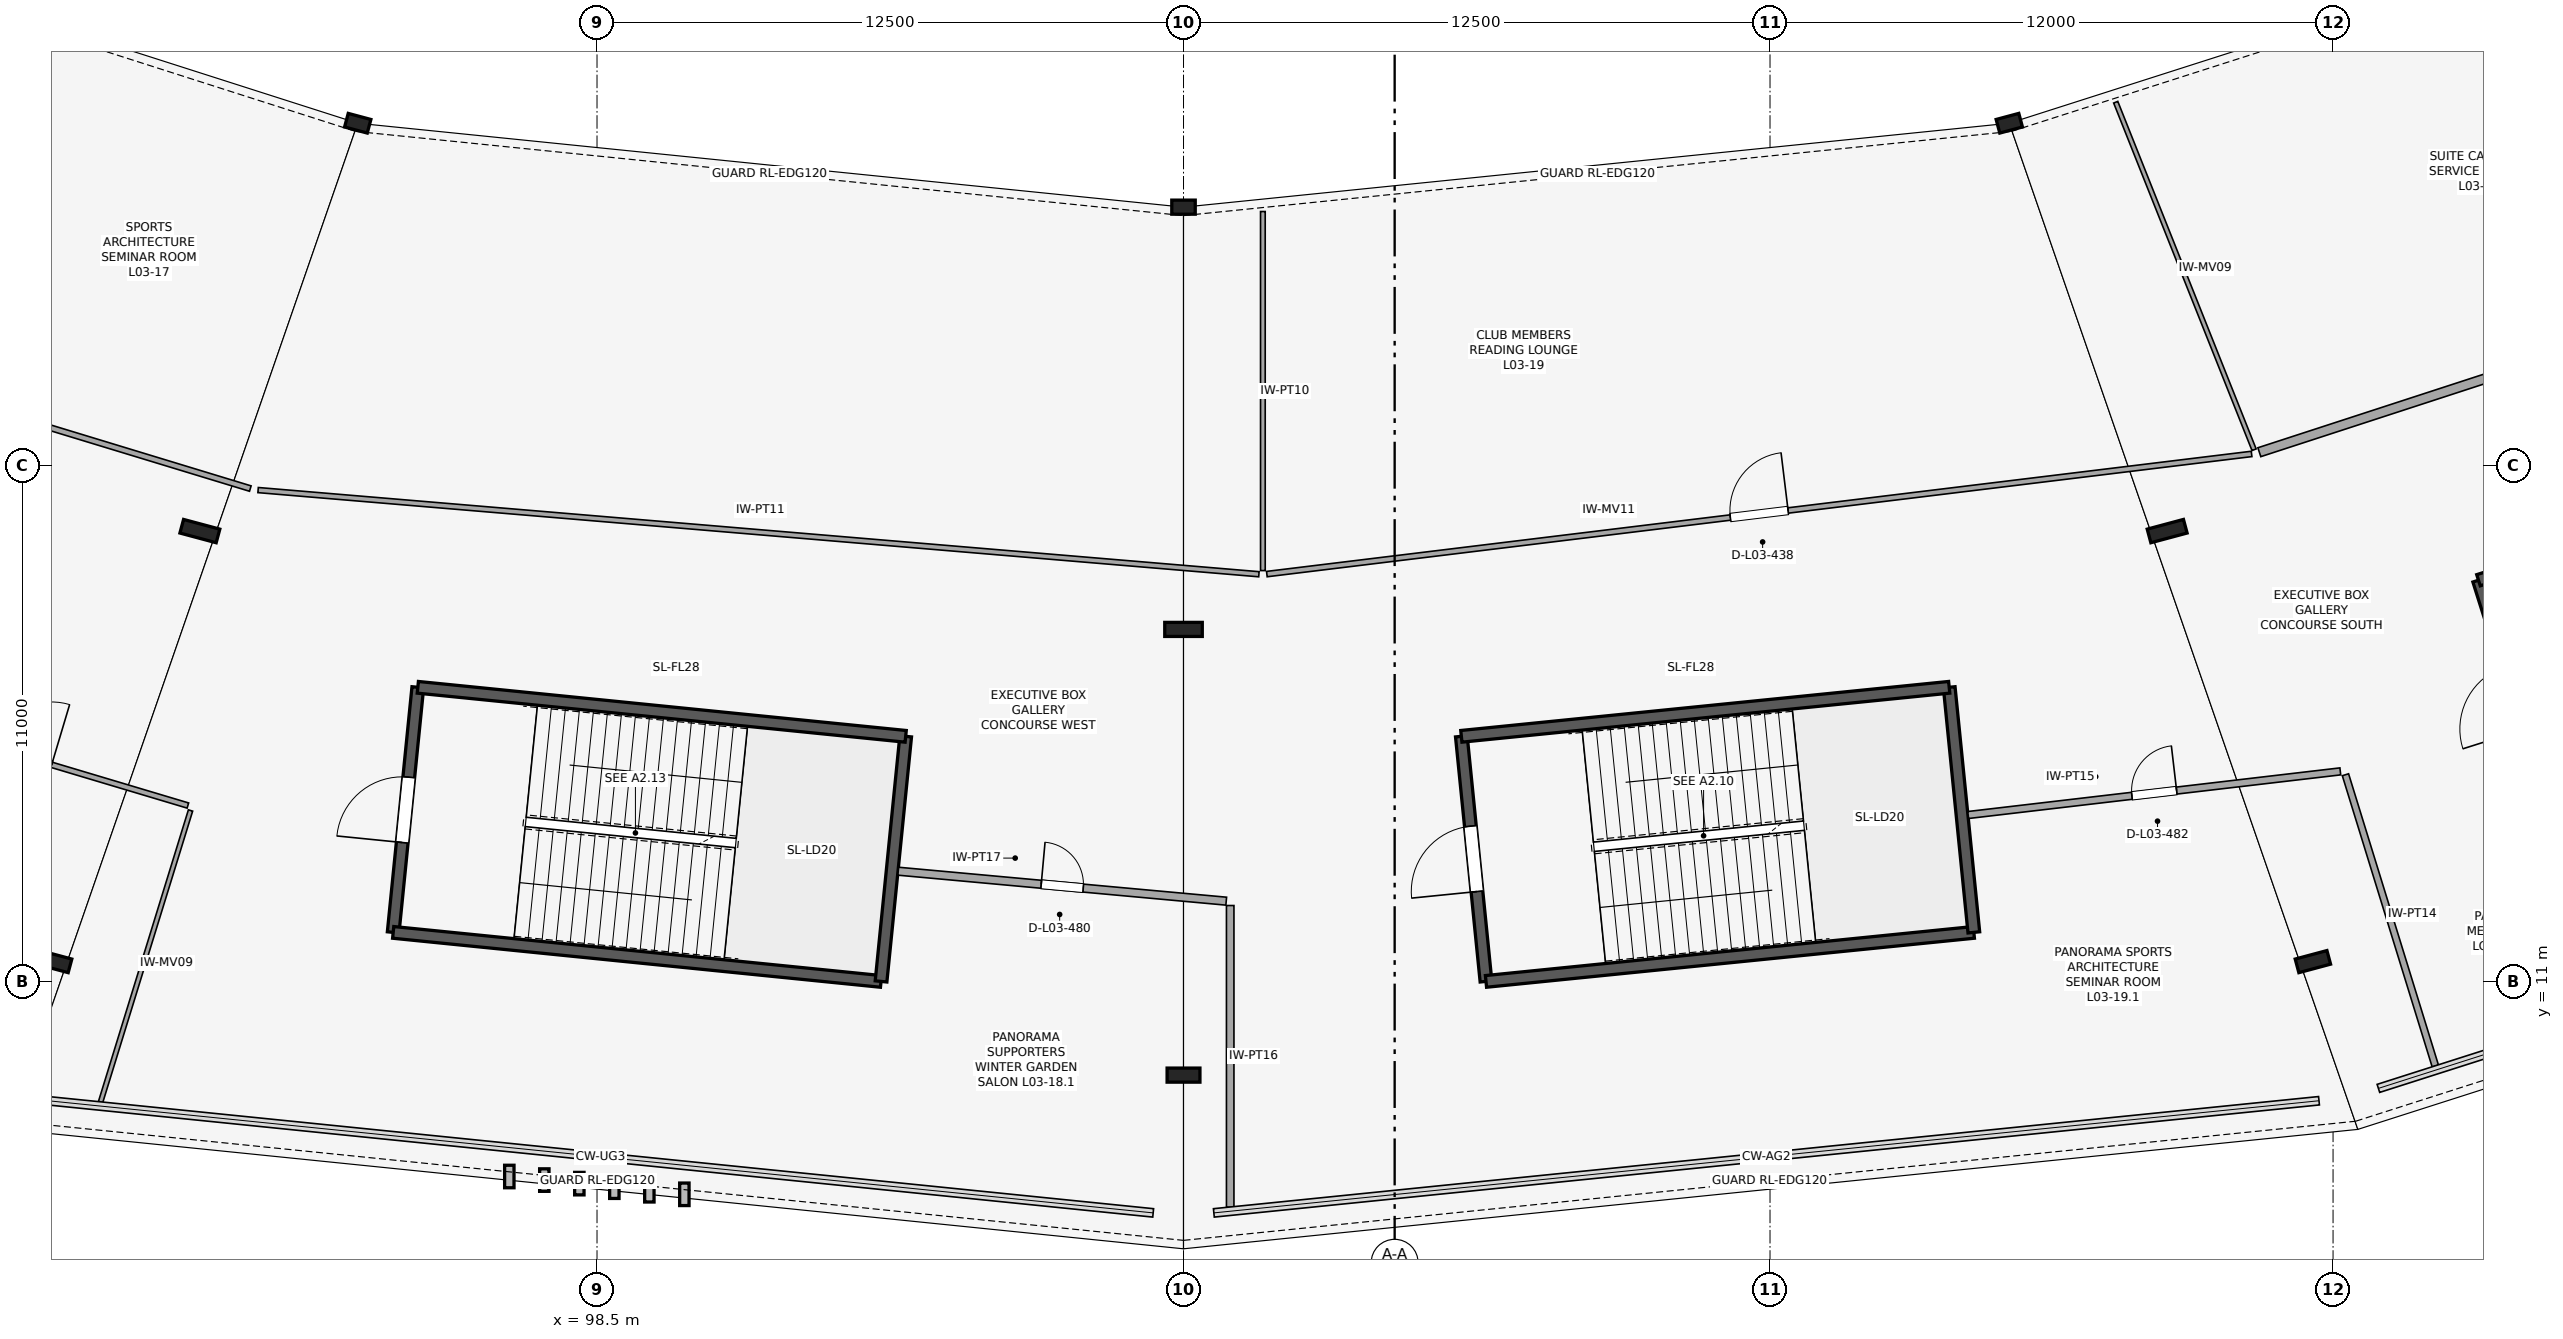
"""IFC4 building model, lengths in metres.
Left out: names, types, materials, properties, quantities, classifications, styles, units other than length and angle.
Written with IfcOpenShell. Run it as: python <this file> out.ifc"""

import sys

from ifc_helpers import new_model, si_unit, direction, frame, frame_2d, origin, origin_2d, place, context, subcontext, project, spatial, rectangle, i_section, extrude, element, fill, save


model = new_model("IFC4")
c1 = context("Model", 3, precision=1e-05, world=origin(), true_north=direction((0.0, 1.0)))
c2 = subcontext(c1, "Body", "Model", "MODEL_VIEW")
j1 = project(units=[si_unit("LENGTHUNIT", "METRE"), si_unit("PLANEANGLEUNIT", "RADIAN")], contexts=[c1])
p1 = place(None, origin())
s1 = spatial("IfcSite", under=j1, at=p1, CompositionType="ELEMENT")
p2 = place(p1, origin())
s2 = spatial("IfcBuilding", under=s1, at=p2, CompositionType="ELEMENT")
p3 = place(p2, frame((0.0, 0.0, 15.6)))
s3 = spatial("IfcBuildingStorey", under=s2, at=p3, CompositionType="ELEMENT", Elevation=15.6)
for number, where, z_axis, x_axis in (
    (1, (93.4, 29.289, 0.0), (0.0, 0.0, 1.0), (-0.259, -0.966, 0.0)),
    (2, (111.0, 27.5, 0.0), (0.0, 0.0, 1.0), (0.0, -1.0, 0.0)),
    (3, (128.6, 29.289, 0.0), (0.0, 0.0, 1.0), (0.259, -0.966, 0.0)),
):
    element("IfcColumn", number, at=place(p3, frame(where, z_axis=z_axis, x_axis=x_axis)), inside=s3, PredefinedType="COLUMN", context=c2, shape_type="SweptSolid", body=[
        extrude(i_section(OverallWidth=0.3, OverallDepth=0.5, WebThickness=0.014, FlangeThickness=0.028, FilletRadius=0.027, at=origin_2d()), origin(), (0.0, 0.0, 1.0), 3.48),
    ])
for number, where, z_axis, x_axis in (
    (4, (90.036, 20.596, 0.0), (0.0, 0.0, 1.0), (-0.259, -0.966, 0.0)),
    (5, (111.0, 18.5, 0.0), (0.0, 0.0, 1.0), (0.0, -1.0, 0.0)),
    (6, (131.964, 20.596, 0.0), (0.0, 0.0, 1.0), (0.259, -0.966, 0.0)),
):
    element("IfcColumn", number, at=place(p3, frame(where, z_axis=z_axis, x_axis=x_axis)), inside=s3, PredefinedType="COLUMN", context=c2, shape_type="SweptSolid", body=[
        extrude(i_section(OverallWidth=0.3, OverallDepth=0.8, WebThickness=0.018, FlangeThickness=0.033, FilletRadius=0.03, at=origin_2d()), origin(), (0.0, 0.0, 1.0), 5.2),
    ])
for number, where, z_axis, x_axis in (
    (7, (86.93, 11.419, 0.0), (0.0, 0.0, 1.0), (-0.259, -0.966, 0.0)),
    (8, (111.0, 9.0, 0.0), (0.0, 0.0, 1.0), (0.0, -1.0, 0.0)),
    (9, (135.07, 11.419, 0.0), (0.0, 0.0, 1.0), (0.259, -0.966, 0.0)),
):
    element("IfcColumn", number, at=place(p3, frame(where, z_axis=z_axis, x_axis=x_axis)), inside=s3, PredefinedType="COLUMN", context=c2, shape_type="SweptSolid", body=[
        extrude(i_section(OverallWidth=0.3, OverallDepth=0.7, WebThickness=0.017, FlangeThickness=0.032, FilletRadius=0.027, at=origin_2d()), origin(), (0.0, 0.0, 1.0), 5.2),
    ])
p4 = place(p3, frame((116.921, 16.221, 0.0), z_axis=(0.0, 0.0, 1.0), x_axis=(0.100028593886, -0.994984562898, 0.0)))
e10 = element("IfcWall", 10, at=p4, inside=s3, PredefinedType="SHEAR", context=c2, shape_type="SweptSolid", body=[
    extrude(rectangle(XDim=5.25, YDim=0.25, at=frame_2d((2.625, 0.0))), origin(), (0.0, 0.0, 1.0), 4.9),
])
p5 = place(p4, frame((1.925, 0.0, 0.0)))
e11 = element("IfcOpeningElement", 11, at=p5, cuts=e10, PredefinedType="OPENING", context=c2, shape_type="SweptSolid", body=[
    extrude(rectangle(XDim=1.4, YDim=2.2, at=frame_2d((0.7, 1.1))), frame((0.0, 0.135, 0.0), z_axis=(0.0, -1.0, 0.0), x_axis=(1.0, 0.0, 0.0)), (0.0, 0.0, 1.0), 0.27),
])
p6 = place(p3, frame((117.447, 10.997, 0.0), z_axis=(0.0, 0.0, 1.0), x_axis=(0.994985938948, 0.100014905366, 0.0)))
e12 = element("IfcWall", 12, at=p6, inside=s3, PredefinedType="SHEAR", context=c2, shape_type="SweptSolid", body=[
    extrude(rectangle(XDim=10.45, YDim=0.25, at=frame_2d((5.225, 0.0))), origin(), (0.0, 0.0, 1.0), 4.9),
])
p7 = place(p3, frame((127.844, 12.042, 0.0), z_axis=(0.0, 0.0, 1.0), x_axis=(-0.100028593886, 0.994984562898, 0.0)))
e13 = element("IfcWall", 13, at=p7, inside=s3, PredefinedType="SHEAR", context=c2, shape_type="SweptSolid", body=[
    extrude(rectangle(XDim=5.25, YDim=0.25, at=frame_2d((2.625, 0.0))), origin(), (0.0, 0.0, 1.0), 4.9),
])
p8 = place(p3, frame((127.319, 17.266, 0.0), z_axis=(0.0, 0.0, 1.0), x_axis=(-0.994985938948, -0.100014905366, 0.0)))
e14 = element("IfcWall", 14, at=p8, inside=s3, PredefinedType="SHEAR", context=c2, shape_type="SweptSolid", body=[
    extrude(rectangle(XDim=10.45, YDim=0.25, at=frame_2d((5.225, 0.0))), origin(), (0.0, 0.0, 1.0), 4.9),
])
p9 = place(p3, frame((138.6, 19.548, 0.0), z_axis=(0.0, 0.0, 1.0), x_axis=(0.30152749866, -0.953457480726, 0.0)))
e15 = element("IfcWall", 15, at=p9, inside=s3, PredefinedType="SHEAR", context=c2, shape_type="SweptSolid", body=[
    extrude(rectangle(XDim=5.25, YDim=0.25, at=frame_2d((2.625, 0.0))), origin(), (0.0, 0.0, 1.0), 4.9),
])
p10 = place(p9, frame((1.925, 0.0, 0.0)))
e16 = element("IfcOpeningElement", 16, at=p10, cuts=e15, PredefinedType="OPENING", context=c2, shape_type="SweptSolid", body=[
    extrude(rectangle(XDim=1.4, YDim=2.2, at=frame_2d((0.7, 1.1))), frame((0.0, 0.135, 0.0), z_axis=(0.0, -1.0, 0.0), x_axis=(1.0, 0.0, 0.0)), (0.0, 0.0, 1.0), 0.27),
])
p11 = place(p3, frame((148.563, 22.699, 0.0), z_axis=(0.0, 0.0, 1.0), x_axis=(-0.953459710305, -0.301520448438, 0.0)))
e17 = element("IfcWall", 17, at=p11, inside=s3, PredefinedType="SHEAR", context=c2, shape_type="SweptSolid", body=[
    extrude(rectangle(XDim=10.45, YDim=0.25, at=frame_2d((5.225, 0.0))), origin(), (0.0, 0.0, 1.0), 4.9),
])
p12 = place(p3, frame((94.681, 17.266, 0.0), z_axis=(0.0, 0.0, 1.0), x_axis=(-0.10002396577, -0.994985028165, 0.0)))
e18 = element("IfcWall", 18, at=p12, inside=s3, PredefinedType="SHEAR", context=c2, shape_type="SweptSolid", body=[
    extrude(rectangle(XDim=5.25, YDim=0.25, at=frame_2d((2.625, 0.0))), origin(), (0.0, 0.0, 1.0), 4.9),
])
p13 = place(p12, frame((1.925, 0.0, 0.0)))
e19 = element("IfcOpeningElement", 19, at=p13, cuts=e18, PredefinedType="OPENING", context=c2, shape_type="SweptSolid", body=[
    extrude(rectangle(XDim=1.4, YDim=2.2, at=frame_2d((0.7, 1.1))), frame((0.0, 0.135, 0.0), z_axis=(0.0, -1.0, 0.0), x_axis=(1.0, 0.0, 0.0)), (0.0, 0.0, 1.0), 0.27),
])
p14 = place(p3, frame((94.156, 12.042, 0.0), z_axis=(0.0, 0.0, 1.0), x_axis=(0.994988263568, -0.09999177647, 0.0)))
e20 = element("IfcWall", 20, at=p14, inside=s3, PredefinedType="SHEAR", context=c2, shape_type="SweptSolid", body=[
    extrude(rectangle(XDim=10.45, YDim=0.25, at=frame_2d((5.225, 0.0))), origin(), (0.0, 0.0, 1.0), 4.9),
])
p15 = place(p3, frame((104.553, 10.997, 0.0), z_axis=(0.0, 0.0, 1.0), x_axis=(0.099982555566, 0.994989190184, 0.0)))
e21 = element("IfcWall", 21, at=p15, inside=s3, PredefinedType="SHEAR", context=c2, shape_type="SweptSolid", body=[
    extrude(rectangle(XDim=5.25, YDim=0.25, at=frame_2d((2.625, 0.0))), origin(), (0.0, 0.0, 1.0), 4.9),
])
p16 = place(p3, frame((105.078, 16.221, 0.0), z_axis=(0.0, 0.0, 1.0), x_axis=(-0.994985705245, 0.100017230303, 0.0)))
e22 = element("IfcWall", 22, at=p16, inside=s3, PredefinedType="SHEAR", context=c2, shape_type="SweptSolid", body=[
    extrude(rectangle(XDim=10.45, YDim=0.25, at=frame_2d((5.225, 0.0))), origin(), (0.0, 0.0, 1.0), 4.9),
])
p17 = place(p3, frame((72.946, 27.027, 0.0), z_axis=(0.0, 0.0, 1.0), x_axis=(0.956723233709, -0.290999405637, 0.0)))
e23 = element("IfcWall", 23, at=p17, inside=s3, PredefinedType="PARTITIONING", context=c2, shape_type="SweptSolid", body=[
    extrude(rectangle(XDim=18.986, YDim=0.12, at=frame_2d((9.493, 0.0))), origin(), (0.0, 0.0, 1.0), 2.45),
])
p18 = place(p17, frame((8.913, 0.0, 0.0)))
e24 = element("IfcOpeningElement", 24, at=p18, cuts=e23, PredefinedType="OPENING", context=c2, shape_type="SweptSolid", body=[
    extrude(rectangle(XDim=1.16, YDim=2.1, at=frame_2d((0.58, 1.05))), frame((0.0, 0.07, 0.0), z_axis=(0.0, -1.0, 0.0), x_axis=(1.0, 0.0, 0.0)), (0.0, 0.0, 1.0), 0.14),
])
p19 = place(p3, frame((91.277, 21.47, 0.0), z_axis=(0.0, 0.0, 1.0), x_axis=(0.996481037388, -0.083818507065, 0.0)))
e25 = element("IfcWall", 25, at=p19, inside=s3, PredefinedType="PARTITIONING", context=c2, shape_type="SweptSolid", body=[
    extrude(rectangle(XDim=21.406, YDim=0.11, at=frame_2d((10.703, 0.0))), origin(), (0.0, 0.0, 1.0), 2.45),
])
p20 = place(p3, frame((112.691, 27.407, 0.0), z_axis=(0.0, 0.0, 1.0), x_axis=(3.1900979e-05, -0.999999999491, 0.0)))
e26 = element("IfcWall", 26, at=p20, inside=s3, PredefinedType="PARTITIONING", context=c2, shape_type="SweptSolid", body=[
    extrude(rectangle(XDim=7.653, YDim=0.1, at=frame_2d((3.827, 0.0))), origin(), (0.0, 0.0, 1.0), 2.45),
])
p21 = place(p3, frame((112.776, 19.679, 0.0), z_axis=(0.0, 0.0, 1.0), x_axis=(0.992637076034, 0.121126525924, 0.0)))
e27 = element("IfcWall", 27, at=p21, inside=s3, PredefinedType="MOVABLE", context=c2, shape_type="SweptSolid", body=[
    extrude(rectangle(XDim=21.144, YDim=0.115, at=frame_2d((10.572, 0.0))), origin(), (0.0, 0.0, 1.0), 2.45),
])
p22 = place(p21, frame((9.952, 0.0, 0.0)))
e28 = element("IfcOpeningElement", 28, at=p22, cuts=e27, PredefinedType="OPENING", context=c2, shape_type="SweptSolid", body=[
    extrude(rectangle(XDim=1.24, YDim=2.24, at=frame_2d((0.62, 1.12))), frame((0.0, 0.067, 0.0), z_axis=(0.0, -1.0, 0.0), x_axis=(1.0, 0.0, 0.0)), (0.0, 0.0, 1.0), 0.135),
])
p23 = place(p3, frame((130.868, 29.737, 0.0), z_axis=(0.0, 0.0, 1.0), x_axis=(0.3698220883, -0.92910259014, 0.0)))
e29 = element("IfcWall", 29, at=p23, inside=s3, PredefinedType="MOVABLE", context=c2, shape_type="SweptSolid", body=[
    extrude(rectangle(XDim=7.973, YDim=0.095, at=frame_2d((3.986, 0.0))), origin(), (0.0, 0.0, 1.0), 2.45),
])
p24 = place(p3, frame((133.929, 22.277, 0.0), z_axis=(0.0, 0.0, 1.0), x_axis=(0.950832746892, 0.309704839223, 0.0)))
e30 = element("IfcWall", 30, at=p24, inside=s3, PredefinedType="PARTITIONING", context=c2, shape_type="SweptSolid", body=[
    extrude(rectangle(XDim=18.582, YDim=0.2, at=frame_2d((9.291, 0.0))), origin(), (0.0, 0.0, 1.0), 2.45),
])
p25 = place(p24, frame((8.841, 0.0, 0.0)))
e31 = element("IfcOpeningElement", 31, at=p25, cuts=e30, PredefinedType="OPENING", context=c2, shape_type="SweptSolid", body=[
    extrude(rectangle(XDim=0.9, YDim=2.24, at=frame_2d((0.45, 1.12))), frame((0.0, 0.11, 0.0), z_axis=(0.0, -1.0, 0.0), x_axis=(1.0, 0.0, 0.0)), (0.0, 0.0, 1.0), 0.22),
])
p26 = place(p3, frame((82.688, 16.865, 0.0), z_axis=(0.0, 0.0, 1.0), x_axis=(0.958149765672, -0.286267403913, 0.0)))
e32 = element("IfcWall", 32, at=p26, inside=s3, PredefinedType="MOVABLE", context=c2, shape_type="SweptSolid", body=[
    extrude(rectangle(XDim=7.402, YDim=0.115, at=frame_2d((3.701, 0.0))), origin(), (0.0, 0.0, 1.0), 2.45),
])
p27 = place(p26, frame((3.031, 0.0, 0.0)))
e33 = element("IfcOpeningElement", 33, at=p27, cuts=e32, PredefinedType="OPENING", context=c2, shape_type="SweptSolid", body=[
    extrude(rectangle(XDim=1.34, YDim=2.1, at=frame_2d((0.67, 1.05))), frame((0.0, 0.067, 0.0), z_axis=(0.0, -1.0, 0.0), x_axis=(1.0, 0.0, 0.0)), (0.0, 0.0, 1.0), 0.135),
])
p28 = place(p3, frame((89.836, 14.641, 0.0), z_axis=(0.0, 0.0, 1.0), x_axis=(-0.294734485417, -0.95557918725, 0.0)))
e34 = element("IfcWall", 34, at=p28, inside=s3, PredefinedType="MOVABLE", context=c2, shape_type="SweptSolid", body=[
    extrude(rectangle(XDim=6.506, YDim=0.095, at=frame_2d((3.253, 0.0))), origin(), (0.0, 0.0, 1.0), 2.45),
])
p29 = place(p3, frame((104.92, 13.346, 0.0), z_axis=(0.0, 0.0, 1.0), x_axis=(0.995852050998, -0.09098732067, 0.0)))
e35 = element("IfcWall", 35, at=p29, inside=s3, PredefinedType="PARTITIONING", context=c2, shape_type="SweptSolid", body=[
    extrude(rectangle(XDim=7.019, YDim=0.17, at=frame_2d((3.51, 0.0))), origin(), (0.0, 0.0, 1.0), 2.45),
])
p30 = place(p29, frame((3.06, 0.0, 0.0)))
e36 = element("IfcOpeningElement", 36, at=p30, cuts=e35, PredefinedType="OPENING", context=c2, shape_type="SweptSolid", body=[
    extrude(rectangle(XDim=0.9, YDim=2.24, at=frame_2d((0.45, 1.12))), frame((0.0, 0.095, 0.0), z_axis=(0.0, -1.0, 0.0), x_axis=(1.0, 0.0, 0.0)), (0.0, 0.0, 1.0), 0.19),
])
p31 = place(p3, frame((111.995, 12.615, 0.0), z_axis=(0.0, 0.0, 1.0), x_axis=(-3.796219e-05, -0.999999999279, 0.0)))
e37 = element("IfcWall", 37, at=p31, inside=s3, PredefinedType="PARTITIONING", context=c2, shape_type="SweptSolid", body=[
    extrude(rectangle(XDim=6.431, YDim=0.16, at=frame_2d((3.216, 0.0))), origin(), (0.0, 0.0, 1.0), 2.45),
])
p32 = place(p3, frame((127.723, 14.544, 0.0), z_axis=(0.0, 0.0, 1.0), x_axis=(0.993196645999, 0.116449226602, 0.0)))
e38 = element("IfcWall", 38, at=p32, inside=s3, PredefinedType="PARTITIONING", context=c2, shape_type="SweptSolid", body=[
    extrude(rectangle(XDim=7.986, YDim=0.15, at=frame_2d((3.993, 0.0))), origin(), (0.0, 0.0, 1.0), 2.45),
])
p33 = place(p32, frame((3.513, 0.0, 0.0)))
e39 = element("IfcOpeningElement", 39, at=p33, cuts=e38, PredefinedType="OPENING", context=c2, shape_type="SweptSolid", body=[
    extrude(rectangle(XDim=0.96, YDim=2.1, at=frame_2d((0.48, 1.05))), frame((0.0, 0.085, 0.0), z_axis=(0.0, -1.0, 0.0), x_axis=(1.0, 0.0, 0.0)), (0.0, 0.0, 1.0), 0.17),
])
p34 = place(p3, frame((135.764, 15.403, 0.0), z_axis=(0.0, 0.0, 1.0), x_axis=(0.294798640685, -0.955559397133, 0.0)))
e40 = element("IfcWall", 40, at=p34, inside=s3, PredefinedType="PARTITIONING", context=c2, shape_type="SweptSolid", body=[
    extrude(rectangle(XDim=6.498, YDim=0.14, at=frame_2d((3.249, 0.0))), origin(), (0.0, 0.0, 1.0), 2.45),
])
p35 = place(p5, frame((1.4, 0.0, 0.0), z_axis=(0.0, 0.0, 1.0), x_axis=(-1.0, 0.0, 0.0)))
e41 = element("IfcDoor", 41, at=p35, inside=s3, OperationType="SINGLE_SWING_LEFT", PredefinedType="DOOR", context=c2, shape_type="SweptSolid", body=[
    extrude(rectangle(XDim=1.4, YDim=2.2, at=frame_2d((0.7, 1.1))), frame((0.0, 0.025, 0.0), z_axis=(0.0, -1.0, 0.0), x_axis=(1.0, 0.0, 0.0)), (0.0, 0.0, 1.0), 0.05),
])
fill(e11, e41)
p36 = place(p13, frame((1.4, 0.0, 0.0), z_axis=(0.0, 0.0, 1.0), x_axis=(-1.0, 0.0, 0.0)))
e42 = element("IfcDoor", 42, at=p36, inside=s3, OperationType="SINGLE_SWING_LEFT", PredefinedType="DOOR", context=c2, shape_type="SweptSolid", body=[
    extrude(rectangle(XDim=1.4, YDim=2.2, at=frame_2d((0.7, 1.1))), frame((0.0, 0.025, 0.0), z_axis=(0.0, -1.0, 0.0), x_axis=(1.0, 0.0, 0.0)), (0.0, 0.0, 1.0), 0.05),
])
fill(e19, e42)
p37 = place(p22, origin())
e43 = element("IfcDoor", 43, at=p37, inside=s3, OperationType="SINGLE_SWING_RIGHT", PredefinedType="DOOR", context=c2, shape_type="SweptSolid", body=[
    extrude(rectangle(XDim=1.24, YDim=2.24, at=frame_2d((0.62, 1.12))), frame((0.0, 0.025, 0.0), z_axis=(0.0, -1.0, 0.0), x_axis=(1.0, 0.0, 0.0)), (0.0, 0.0, 1.0), 0.05),
])
fill(e28, e43)
p38 = place(p30, origin())
e44 = element("IfcDoor", 44, at=p38, inside=s3, OperationType="SINGLE_SWING_LEFT", PredefinedType="DOOR", context=c2, shape_type="SweptSolid", body=[
    extrude(rectangle(XDim=0.9, YDim=2.24, at=frame_2d((0.45, 1.12))), frame((0.0, 0.025, 0.0), z_axis=(0.0, -1.0, 0.0), x_axis=(1.0, 0.0, 0.0)), (0.0, 0.0, 1.0), 0.05),
])
fill(e36, e44)
p39 = place(p33, origin())
e45 = element("IfcDoor", 45, at=p39, inside=s3, OperationType="SINGLE_SWING_RIGHT", PredefinedType="DOOR", context=c2, shape_type="SweptSolid", body=[
    extrude(rectangle(XDim=0.96, YDim=2.1, at=frame_2d((0.48, 1.05))), frame((0.0, 0.025, 0.0), z_axis=(0.0, -1.0, 0.0), x_axis=(1.0, 0.0, 0.0)), (0.0, 0.0, 1.0), 0.05),
])
fill(e39, e45)
save(model, sys.argv[1])
